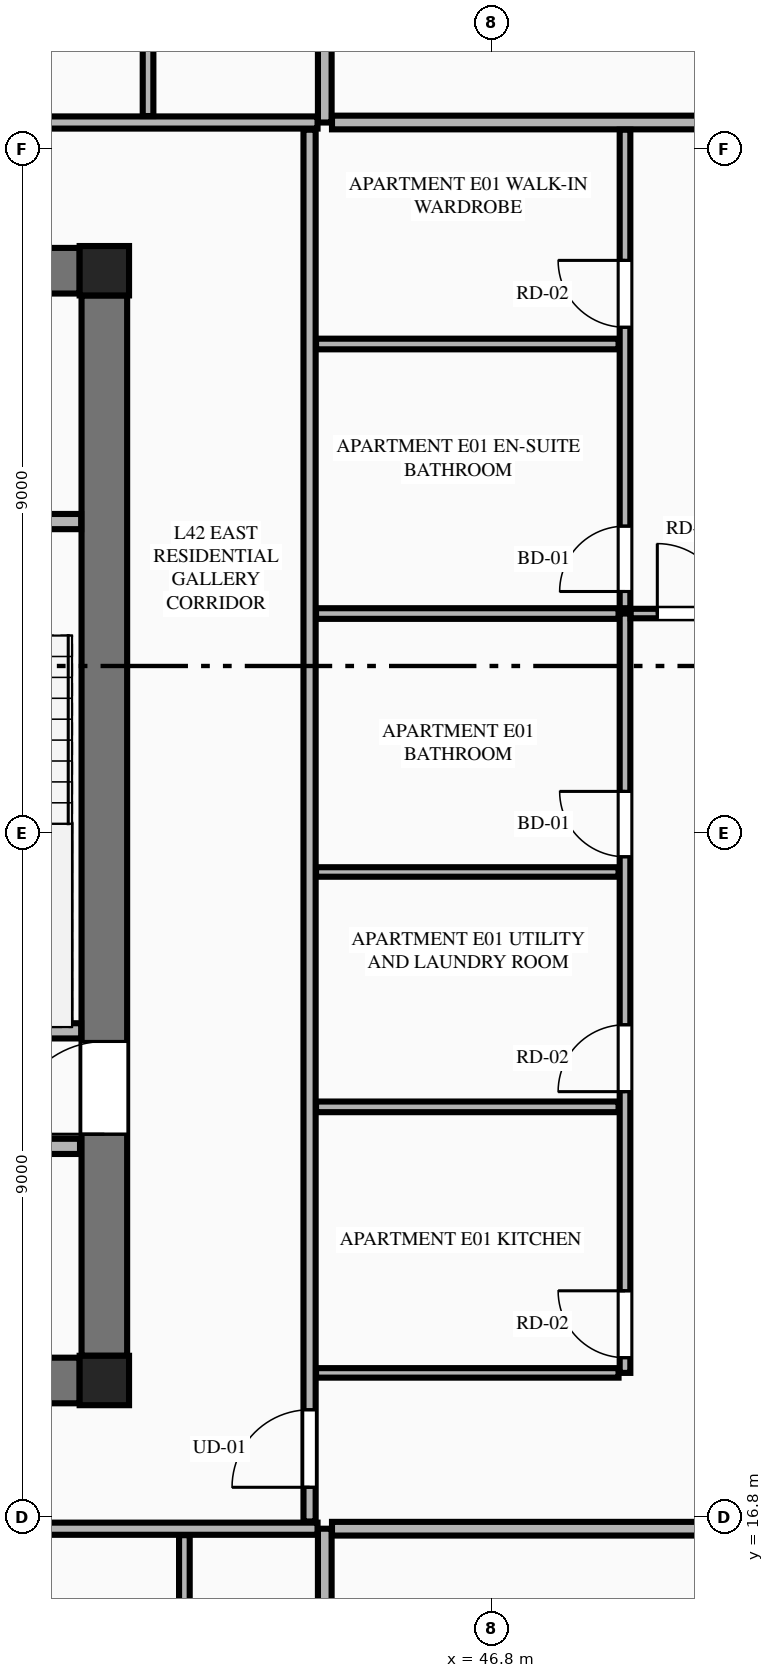
"""IFC4 building model, lengths in metres.
Left out: names, types, materials, properties, quantities, classifications, styles, units other than length and angle.
Written with IfcOpenShell. Run it as: python <this file> out.ifc"""

import sys

from ifc_helpers import new_model, si_unit, direction, frame, frame_2d, origin, origin_2d, place, context, subcontext, project, spatial, rectangle, extrude, element, fill, save


model = new_model("IFC4")
c1 = context("Model", 3, precision=1e-05, world=origin(), true_north=direction((0.0, 1.0)))
c2 = subcontext(c1, "Body", "Model", "MODEL_VIEW")
j1 = project(units=[si_unit("LENGTHUNIT", "METRE"), si_unit("PLANEANGLEUNIT", "RADIAN")], contexts=[c1])
p1 = place(None, origin())
s1 = spatial("IfcSite", under=j1, at=p1, CompositionType="ELEMENT")
p2 = place(p1, origin())
s2 = spatial("IfcBuilding", under=s1, at=p2, CompositionType="ELEMENT")
p3 = place(p2, frame((0.0, 0.0, 160.6)))
s3 = spatial("IfcBuildingStorey", under=s2, at=p3, CompositionType="ELEMENT", Elevation=160.6)
for number, where, z_axis, x_axis in (
    (1, (41.7, 18.6, 0.0), (0.0, 0.0, 1.0), (1.0, 0.0, 0.0)),
    (2, (41.7, 33.2, 0.0), (0.0, 0.0, 1.0), (1.0, 0.0, 0.0)),
):
    element("IfcColumn", number, at=place(p3, frame(where, z_axis=z_axis, x_axis=x_axis)), inside=s3, PredefinedType="COLUMN", context=c2, shape_type="SweptSolid", body=[
        extrude(rectangle(XDim=0.65, YDim=0.65, at=origin_2d()), origin(), (0.0, 0.0, 1.0), 3.55),
    ])
for number, where, z_axis, x_axis in (
    (3, (23.425, 18.6, 0.0), (0.0, 0.0, 1.0), (1.0, 0.0, 0.0)),
    (4, (23.425, 33.2, 0.0), (0.0, 0.0, 1.0), (1.0, 0.0, 0.0)),
):
    element("IfcWall", number, at=place(p3, frame(where, z_axis=z_axis, x_axis=x_axis)), inside=s3, PredefinedType="SHEAR", context=c2, shape_type="SweptSolid", body=[
        extrude(rectangle(XDim=17.95, YDim=0.6, at=frame_2d((8.975, 0.0))), origin(), (0.0, 0.0, 1.0), 3.34),
    ])
p4 = place(p3, frame((41.7, 18.925, 0.0), z_axis=(0.0, 0.0, 1.0), x_axis=(0.0, 1.0, 0.0)))
e5 = element("IfcWall", 5, at=p4, inside=s3, PredefinedType="SHEAR", context=c2, shape_type="SweptSolid", body=[
    extrude(rectangle(XDim=13.95, YDim=0.6, at=frame_2d((6.975, 0.0))), origin(), (0.0, 0.0, 1.0), 3.34),
])
p5 = place(p4, frame((2.915, 0.0, 0.0)))
e6 = element("IfcOpeningElement", 6, at=p5, cuts=e5, PredefinedType="OPENING", context=c2, shape_type="SweptSolid", body=[
    extrude(rectangle(XDim=1.22, YDim=2.25, at=frame_2d((0.61, 1.125))), frame((0.0, 0.31, 0.0), z_axis=(0.0, -1.0, 0.0), x_axis=(1.0, 0.0, 0.0)), (0.0, 0.0, 1.0), 0.62),
])
p6 = place(p3, frame((38.125, 23.2, 0.0), z_axis=(0.0, 0.0, 1.0), x_axis=(1.0, 0.0, 0.0)))
e7 = element("IfcWall", 7, at=p6, inside=s3, PredefinedType="PLUMBINGWALL", context=c2, shape_type="SweptSolid", body=[
    extrude(rectangle(XDim=3.27, YDim=0.2, at=frame_2d((1.635, 0.0))), origin(), (0.0, 0.0, 1.0), 3.34),
])
p7 = place(p3, frame((38.125, 29.9, 0.0), z_axis=(0.0, 0.0, 1.0), x_axis=(1.0, 0.0, 0.0)))
e8 = element("IfcWall", 8, at=p7, inside=s3, PredefinedType="PLUMBINGWALL", context=c2, shape_type="SweptSolid", body=[
    extrude(rectangle(XDim=3.27, YDim=0.2, at=frame_2d((1.635, 0.0))), origin(), (0.0, 0.0, 1.0), 3.34),
])
p8 = place(p7, frame((0.5, 0.0, 0.0)))
e9 = element("IfcOpeningElement", 9, at=p8, cuts=e8, PredefinedType="OPENING", context=c2, shape_type="SweptSolid", body=[
    extrude(rectangle(XDim=0.85, YDim=2.05, at=frame_2d((0.425, 1.025))), frame((0.0, 0.11, 0.0), z_axis=(0.0, -1.0, 0.0), x_axis=(1.0, 0.0, 0.0)), (0.0, 0.0, 1.0), 0.22),
])
p9 = place(p3, frame((23.42, 21.68, 0.0), z_axis=(0.0, 0.0, 1.0), x_axis=(1.0, 0.0, 0.0)))
e10 = element("IfcWall", 10, at=p9, inside=s3, PredefinedType="PLUMBINGWALL", context=c2, shape_type="SweptSolid", body=[
    extrude(rectangle(XDim=17.96, YDim=0.2, at=frame_2d((8.98, 0.0))), origin(), (0.0, 0.0, 1.0), 3.34),
])
p10 = place(p9, frame((11.6, 0.0, 0.0)))
e11 = element("IfcOpeningElement", 11, at=p10, cuts=e10, PredefinedType="OPENING", context=c2, shape_type="SweptSolid", body=[
    extrude(rectangle(XDim=1.1, YDim=2.2, at=frame_2d((0.55, 1.1))), frame((0.0, 0.11, 0.0), z_axis=(0.0, -1.0, 0.0), x_axis=(1.0, 0.0, 0.0)), (0.0, 0.0, 1.0), 0.22),
])
p11 = place(p9, frame((0.41, 0.0, 0.0)))
e12 = element("IfcOpeningElement", 12, at=p11, cuts=e10, PredefinedType="OPENING", context=c2, shape_type="SweptSolid", body=[
    extrude(rectangle(XDim=0.85, YDim=2.05, at=frame_2d((0.425, 1.025))), frame((0.0, 0.11, 0.0), z_axis=(0.0, -1.0, 0.0), x_axis=(1.0, 0.0, 0.0)), (0.0, 0.0, 1.0), 0.22),
])
p12 = place(p9, frame((6.03, 0.0, 0.0)))
e13 = element("IfcOpeningElement", 13, at=p12, cuts=e10, PredefinedType="OPENING", context=c2, shape_type="SweptSolid", body=[
    extrude(rectangle(XDim=0.85, YDim=2.05, at=frame_2d((0.425, 1.025))), frame((0.0, 0.11, 0.0), z_axis=(0.0, -1.0, 0.0), x_axis=(1.0, 0.0, 0.0)), (0.0, 0.0, 1.0), 0.22),
])
p13 = place(p9, frame((13.78, 0.0, 0.0)))
e14 = element("IfcOpeningElement", 14, at=p13, cuts=e10, PredefinedType="OPENING", context=c2, shape_type="SweptSolid", body=[
    extrude(rectangle(XDim=0.85, YDim=2.05, at=frame_2d((0.425, 1.025))), frame((0.0, 0.11, 0.0), z_axis=(0.0, -1.0, 0.0), x_axis=(1.0, 0.0, 0.0)), (0.0, 0.0, 1.0), 0.22),
])
p14 = place(p3, frame((44.6, 4.105, 0.0), z_axis=(0.0, 0.0, 1.0), x_axis=(0.0, 1.0, 0.0)))
e15 = element("IfcWall", 15, at=p14, inside=s3, PredefinedType="PARTITIONING", context=c2, shape_type="SweptSolid", body=[
    extrude(rectangle(XDim=12.545, YDim=0.18, at=frame_2d((6.272, 0.0))), origin(), (0.0, 0.0, 1.0), 3.34),
])
p15 = place(p3, frame((20.295, 16.65, 0.0), z_axis=(0.0, 0.0, 1.0), x_axis=(1.0, 0.0, 0.0)))
e16 = element("IfcWall", 16, at=p15, inside=s3, PredefinedType="PARTITIONING", context=c2, shape_type="SweptSolid", body=[
    extrude(rectangle(XDim=24.21, YDim=0.16, at=frame_2d((12.105, 0.0))), origin(), (0.0, 0.0, 1.0), 3.34),
])
p16 = place(p15, frame((0.405, 0.0, 0.0)))
e17 = element("IfcOpeningElement", 17, at=p16, cuts=e16, PredefinedType="OPENING", context=c2, shape_type="SweptSolid", body=[
    extrude(rectangle(XDim=1.35, YDim=2.35, at=frame_2d((0.675, 1.175))), frame((0.0, 0.09, 0.0), z_axis=(0.0, -1.0, 0.0), x_axis=(1.0, 0.0, 0.0)), (0.0, 0.0, 1.0), 0.18),
])
p17 = place(p3, frame((42.753, 11.592, 0.0), z_axis=(0.0, 0.0, 1.0), x_axis=(0.0, 1.0, 0.0)))
e18 = element("IfcWall", 18, at=p17, inside=s3, PredefinedType="PLUMBINGWALL", context=c2, shape_type="SweptSolid", body=[
    extrude(rectangle(XDim=4.973, YDim=0.14, at=frame_2d((2.486, 0.0))), origin(), (0.0, 0.0, 1.0), 2.722),
])
p18 = place(p3, frame((44.6, 35.15, 0.0), z_axis=(0.0, 0.0, 1.0), x_axis=(0.0, 1.0, 0.0)))
e19 = element("IfcWall", 19, at=p18, inside=s3, PredefinedType="PARTITIONING", context=c2, shape_type="SweptSolid", body=[
    extrude(rectangle(XDim=12.345, YDim=0.18, at=frame_2d((6.173, 0.0))), origin(), (0.0, 0.0, 1.0), 3.34),
])
p19 = place(p3, frame((20.295, 35.15, 0.0), z_axis=(0.0, 0.0, 1.0), x_axis=(1.0, 0.0, 0.0)))
e20 = element("IfcWall", 20, at=p19, inside=s3, PredefinedType="PARTITIONING", context=c2, shape_type="SweptSolid", body=[
    extrude(rectangle(XDim=24.21, YDim=0.16, at=frame_2d((12.105, 0.0))), origin(), (0.0, 0.0, 1.0), 3.34),
])
p20 = place(p19, frame((0.405, 0.0, 0.0)))
e21 = element("IfcOpeningElement", 21, at=p20, cuts=e20, PredefinedType="OPENING", context=c2, shape_type="SweptSolid", body=[
    extrude(rectangle(XDim=1.35, YDim=2.35, at=frame_2d((0.675, 1.175))), frame((0.0, 0.09, 0.0), z_axis=(0.0, -1.0, 0.0), x_axis=(1.0, 0.0, 0.0)), (0.0, 0.0, 1.0), 0.18),
])
p21 = place(p3, frame((42.275, 35.235, 0.0), z_axis=(0.0, 0.0, 1.0), x_axis=(0.0, 1.0, 0.0)))
e22 = element("IfcWall", 22, at=p21, inside=s3, PredefinedType="PLUMBINGWALL", context=c2, shape_type="SweptSolid", body=[
    extrude(rectangle(XDim=5.262, YDim=0.14, at=frame_2d((2.631, 0.0))), origin(), (0.0, 0.0, 1.0), 2.722),
])
p22 = place(p3, frame((44.695, 16.65, 0.0), z_axis=(0.0, 0.0, 1.0), x_axis=(1.0, 0.0, 0.0)))
e23 = element("IfcWall", 23, at=p22, inside=s3, PredefinedType="PARTITIONING", context=c2, shape_type="SweptSolid", body=[
    extrude(rectangle(XDim=7.996, YDim=0.18, at=frame_2d((3.998, 0.0))), origin(), (0.0, 0.0, 1.0), 3.34),
])
p23 = place(p3, frame((44.695, 35.15, 0.0), z_axis=(0.0, 0.0, 1.0), x_axis=(1.0, 0.0, 0.0)))
e24 = element("IfcWall", 24, at=p23, inside=s3, PredefinedType="PARTITIONING", context=c2, shape_type="SweptSolid", body=[
    extrude(rectangle(XDim=7.895, YDim=0.18, at=frame_2d((3.948, 0.0))), origin(), (0.0, 0.0, 1.0), 3.34),
])
p24 = place(p3, frame((44.4, 16.745, 0.0), z_axis=(0.0, 0.0, 1.0), x_axis=(0.0, 1.0, 0.0)))
e25 = element("IfcWall", 25, at=p24, inside=s3, PredefinedType="PARTITIONING", context=c2, shape_type="SweptSolid", body=[
    extrude(rectangle(XDim=18.31, YDim=0.16, at=frame_2d((9.155, 0.0))), origin(), (0.0, 0.0, 1.0), 3.34),
])
p25 = place(p24, frame((0.45, 0.0, 0.0)))
e26 = element("IfcOpeningElement", 26, at=p25, cuts=e25, PredefinedType="OPENING", context=c2, shape_type="SweptSolid", body=[
    extrude(rectangle(XDim=1.02, YDim=2.25, at=frame_2d((0.51, 1.125))), frame((0.0, 0.09, 0.0), z_axis=(0.0, -1.0, 0.0), x_axis=(1.0, 0.0, 0.0)), (0.0, 0.0, 1.0), 0.18),
])
p26 = place(p3, frame((44.485, 18.7, 0.0), z_axis=(0.0, 0.0, 1.0), x_axis=(1.0, 0.0, 0.0)))
e27 = element("IfcWall", 27, at=p26, inside=s3, PredefinedType="PARTITIONING", context=c2, shape_type="SweptSolid", body=[
    extrude(rectangle(XDim=3.98, YDim=0.125, at=frame_2d((1.99, 0.0))), origin(), (0.0, 0.0, 1.0), 2.722),
])
p27 = place(p3, frame((48.55, 18.7, 0.0), z_axis=(0.0, 0.0, 1.0), x_axis=(0.0, 1.0, 0.0)))
e28 = element("IfcWall", 28, at=p27, inside=s3, PredefinedType="PLUMBINGWALL", context=c2, shape_type="SweptSolid", body=[
    extrude(rectangle(XDim=9.99, YDim=0.14, at=frame_2d((4.995, 0.0))), origin(), (0.0, 0.0, 1.0), 3.34),
])
p28 = place(p27, frame((0.2, 0.0, 0.0)))
e29 = element("IfcOpeningElement", 29, at=p28, cuts=e28, PredefinedType="OPENING", context=c2, shape_type="SweptSolid", body=[
    extrude(rectangle(XDim=0.88, YDim=2.15, at=frame_2d((0.44, 1.075))), frame((0.0, 0.08, 0.0), z_axis=(0.0, -1.0, 0.0), x_axis=(1.0, 0.0, 0.0)), (0.0, 0.0, 1.0), 0.16),
])
p29 = place(p27, frame((3.7, 0.0, 0.0)))
e30 = element("IfcOpeningElement", 30, at=p29, cuts=e28, PredefinedType="OPENING", context=c2, shape_type="SweptSolid", body=[
    extrude(rectangle(XDim=0.88, YDim=2.15, at=frame_2d((0.44, 1.075))), frame((0.0, 0.08, 0.0), z_axis=(0.0, -1.0, 0.0), x_axis=(1.0, 0.0, 0.0)), (0.0, 0.0, 1.0), 0.16),
])
p30 = place(p27, frame((6.79, 0.0, 0.0)))
e31 = element("IfcOpeningElement", 31, at=p30, cuts=e28, PredefinedType="OPENING", context=c2, shape_type="SweptSolid", body=[
    extrude(rectangle(XDim=0.86, YDim=2.1, at=frame_2d((0.43, 1.05))), frame((0.0, 0.08, 0.0), z_axis=(0.0, -1.0, 0.0), x_axis=(1.0, 0.0, 0.0)), (0.0, 0.0, 1.0), 0.16),
])
p31 = place(p3, frame((48.55, 28.76, 0.0), z_axis=(0.0, 0.0, 1.0), x_axis=(0.0, 1.0, 0.0)))
e32 = element("IfcWall", 32, at=p31, inside=s3, PredefinedType="PLUMBINGWALL", context=c2, shape_type="SweptSolid", body=[
    extrude(rectangle(XDim=6.295, YDim=0.14, at=frame_2d((3.147, 0.0))), origin(), (0.0, 0.0, 1.0), 3.34),
])
p32 = place(p31, frame((0.22, 0.0, 0.0)))
e33 = element("IfcOpeningElement", 33, at=p32, cuts=e32, PredefinedType="OPENING", context=c2, shape_type="SweptSolid", body=[
    extrude(rectangle(XDim=0.86, YDim=2.1, at=frame_2d((0.43, 1.05))), frame((0.0, 0.08, 0.0), z_axis=(0.0, -1.0, 0.0), x_axis=(1.0, 0.0, 0.0)), (0.0, 0.0, 1.0), 0.16),
])
p33 = place(p31, frame((3.696, 0.0, 0.0)))
e34 = element("IfcOpeningElement", 34, at=p33, cuts=e32, PredefinedType="OPENING", context=c2, shape_type="SweptSolid", body=[
    extrude(rectangle(XDim=0.88, YDim=2.15, at=frame_2d((0.44, 1.075))), frame((0.0, 0.08, 0.0), z_axis=(0.0, -1.0, 0.0), x_axis=(1.0, 0.0, 0.0)), (0.0, 0.0, 1.0), 0.16),
])
p34 = place(p3, frame((44.485, 28.69, 0.0), z_axis=(0.0, 0.0, 1.0), x_axis=(1.0, 0.0, 0.0)))
e35 = element("IfcWall", 35, at=p34, inside=s3, PredefinedType="PLUMBINGWALL", context=c2, shape_type="SweptSolid", body=[
    extrude(rectangle(XDim=3.98, YDim=0.14, at=frame_2d((1.99, 0.0))), origin(), (0.0, 0.0, 1.0), 3.34),
])
p35 = place(p3, frame((48.625, 28.69, 0.0), z_axis=(0.0, 0.0, 1.0), x_axis=(1.0, 0.0, 0.0)))
e36 = element("IfcWall", 36, at=p35, inside=s3, PredefinedType="PARTITIONING", context=c2, shape_type="SweptSolid", body=[
    extrude(rectangle(XDim=7.249, YDim=0.125, at=frame_2d((3.625, 0.0))), origin(), (0.0, 0.0, 1.0), 3.34),
])
p36 = place(p35, frame((0.35, 0.0, 0.0)))
e37 = element("IfcOpeningElement", 37, at=p36, cuts=e36, PredefinedType="OPENING", context=c2, shape_type="SweptSolid", body=[
    extrude(rectangle(XDim=0.92, YDim=2.15, at=frame_2d((0.46, 1.075))), frame((0.0, 0.073, 0.0), z_axis=(0.0, -1.0, 0.0), x_axis=(1.0, 0.0, 0.0)), (0.0, 0.0, 1.0), 0.145),
])
p37 = place(p3, frame((44.485, 22.2, 0.0), z_axis=(0.0, 0.0, 1.0), x_axis=(1.0, 0.0, 0.0)))
e38 = element("IfcWall", 38, at=p37, inside=s3, PredefinedType="PLUMBINGWALL", context=c2, shape_type="SweptSolid", body=[
    extrude(rectangle(XDim=3.98, YDim=0.14, at=frame_2d((1.99, 0.0))), origin(), (0.0, 0.0, 1.0), 3.34),
])
p38 = place(p3, frame((44.485, 25.29, 0.0), z_axis=(0.0, 0.0, 1.0), x_axis=(1.0, 0.0, 0.0)))
e39 = element("IfcWall", 39, at=p38, inside=s3, PredefinedType="PARTITIONING", context=c2, shape_type="SweptSolid", body=[
    extrude(rectangle(XDim=3.98, YDim=0.125, at=frame_2d((1.99, 0.0))), origin(), (0.0, 0.0, 1.0), 3.34),
])
p39 = place(p3, frame((44.485, 32.236, 0.0), z_axis=(0.0, 0.0, 1.0), x_axis=(1.0, 0.0, 0.0)))
e40 = element("IfcWall", 40, at=p39, inside=s3, PredefinedType="PLUMBINGWALL", context=c2, shape_type="SweptSolid", body=[
    extrude(rectangle(XDim=3.98, YDim=0.14, at=frame_2d((1.99, 0.0))), origin(), (0.0, 0.0, 1.0), 3.34),
])
p40 = place(p5, origin())
e41 = element("IfcDoor", 41, at=p40, inside=s3, OperationType="SINGLE_SWING_LEFT", PredefinedType="DOOR", context=c2, shape_type="SweptSolid", body=[
    extrude(rectangle(XDim=1.22, YDim=2.25, at=frame_2d((0.61, 1.125))), frame((0.0, 0.025, 0.0), z_axis=(0.0, -1.0, 0.0), x_axis=(1.0, 0.0, 0.0)), (0.0, 0.0, 1.0), 0.05),
])
fill(e6, e41)
p41 = place(p28, origin())
e42 = element("IfcDoor", 42, at=p41, inside=s3, OperationType="SINGLE_SWING_RIGHT", PredefinedType="DOOR", context=c2, shape_type="SweptSolid", body=[
    extrude(rectangle(XDim=0.88, YDim=2.15, at=frame_2d((0.44, 1.075))), frame((0.0, 0.025, 0.0), z_axis=(0.0, -1.0, 0.0), x_axis=(1.0, 0.0, 0.0)), (0.0, 0.0, 1.0), 0.05),
])
fill(e29, e42)
p42 = place(p29, origin())
e43 = element("IfcDoor", 43, at=p42, inside=s3, OperationType="SINGLE_SWING_LEFT", PredefinedType="DOOR", context=c2, shape_type="SweptSolid", body=[
    extrude(rectangle(XDim=0.88, YDim=2.15, at=frame_2d((0.44, 1.075))), frame((0.0, 0.025, 0.0), z_axis=(0.0, -1.0, 0.0), x_axis=(1.0, 0.0, 0.0)), (0.0, 0.0, 1.0), 0.05),
])
fill(e30, e43)
p43 = place(p30, origin())
e44 = element("IfcDoor", 44, at=p43, inside=s3, OperationType="SINGLE_SWING_RIGHT", PredefinedType="DOOR", context=c2, shape_type="SweptSolid", body=[
    extrude(rectangle(XDim=0.86, YDim=2.1, at=frame_2d((0.43, 1.05))), frame((0.0, 0.025, 0.0), z_axis=(0.0, -1.0, 0.0), x_axis=(1.0, 0.0, 0.0)), (0.0, 0.0, 1.0), 0.05),
])
fill(e31, e44)
p44 = place(p32, origin())
e45 = element("IfcDoor", 45, at=p44, inside=s3, OperationType="SINGLE_SWING_LEFT", PredefinedType="DOOR", context=c2, shape_type="SweptSolid", body=[
    extrude(rectangle(XDim=0.86, YDim=2.1, at=frame_2d((0.43, 1.05))), frame((0.0, 0.025, 0.0), z_axis=(0.0, -1.0, 0.0), x_axis=(1.0, 0.0, 0.0)), (0.0, 0.0, 1.0), 0.05),
])
fill(e33, e45)
p45 = place(p33, origin())
e46 = element("IfcDoor", 46, at=p45, inside=s3, OperationType="SINGLE_SWING_RIGHT", PredefinedType="DOOR", context=c2, shape_type="SweptSolid", body=[
    extrude(rectangle(XDim=0.88, YDim=2.15, at=frame_2d((0.44, 1.075))), frame((0.0, 0.025, 0.0), z_axis=(0.0, -1.0, 0.0), x_axis=(1.0, 0.0, 0.0)), (0.0, 0.0, 1.0), 0.05),
])
fill(e34, e46)
p46 = place(p25, origin())
e47 = element("IfcDoor", 47, at=p46, inside=s3, OperationType="SINGLE_SWING_LEFT", PredefinedType="DOOR", context=c2, shape_type="SweptSolid", body=[
    extrude(rectangle(XDim=1.02, YDim=2.25, at=frame_2d((0.51, 1.125))), frame((0.0, 0.025, 0.0), z_axis=(0.0, -1.0, 0.0), x_axis=(1.0, 0.0, 0.0)), (0.0, 0.0, 1.0), 0.05),
])
fill(e26, e47)
p47 = place(p36, origin())
e48 = element("IfcDoor", 48, at=p47, inside=s3, OperationType="SINGLE_SWING_LEFT", PredefinedType="DOOR", context=c2, shape_type="SweptSolid", body=[
    extrude(rectangle(XDim=0.92, YDim=2.15, at=frame_2d((0.46, 1.075))), frame((0.0, 0.025, 0.0), z_axis=(0.0, -1.0, 0.0), x_axis=(1.0, 0.0, 0.0)), (0.0, 0.0, 1.0), 0.05),
])
fill(e37, e48)
save(model, sys.argv[1])
